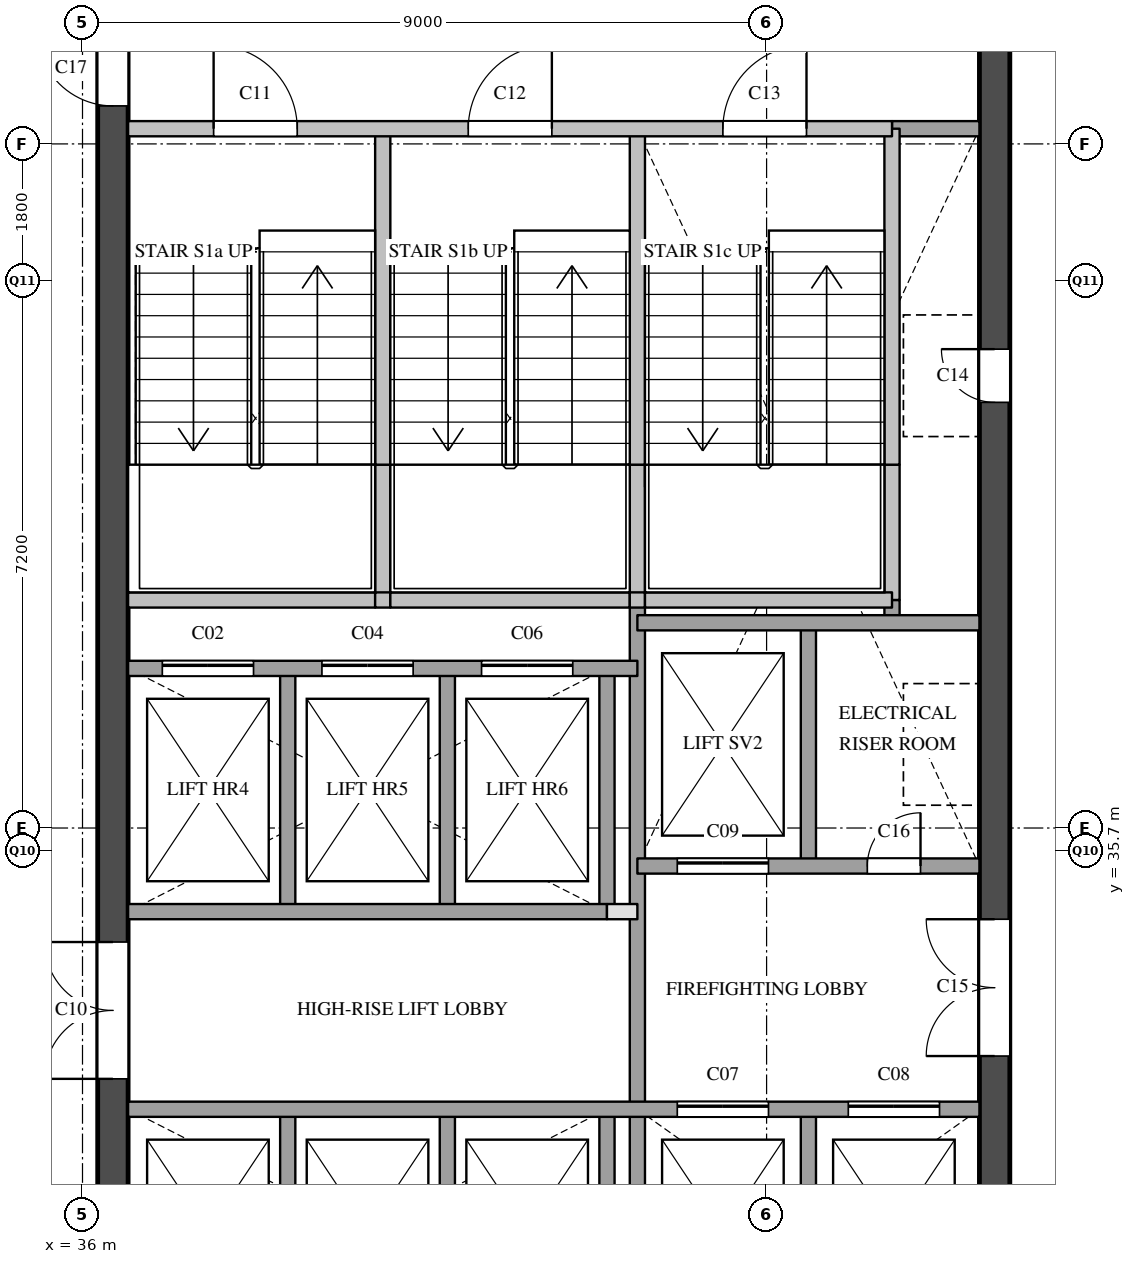
"""IFC4 building model, lengths in metres.
Left out: names, types, materials, properties, quantities, classifications, styles, units other than length and angle.
Written with IfcOpenShell. Run it as: python <this file> out.ifc"""

import sys

from ifc_helpers import new_model, si_unit, direction, frame, frame_2d, origin, place, context, subcontext, project, spatial, rectangle, extrude, element, fill, save


model = new_model("IFC4")
c1 = context("Model", 3, precision=1e-05, world=origin(), true_north=direction((0.0, 1.0)))
c2 = subcontext(c1, "Body", "Model", "MODEL_VIEW")
j1 = project(units=[si_unit("LENGTHUNIT", "METRE"), si_unit("PLANEANGLEUNIT", "RADIAN")], contexts=[c1])
p1 = place(None, origin())
s1 = spatial("IfcSite", under=j1, at=p1, CompositionType="ELEMENT")
p2 = place(p1, origin())
s2 = spatial("IfcBuilding", under=s1, at=p2, CompositionType="ELEMENT")
p3 = place(p2, frame((0.0, 0.0, 257.9)))
s3 = spatial("IfcBuildingStorey", under=s2, at=p3, CompositionType="ELEMENT", Elevation=257.9)
p4 = place(p3, frame((36.4, 29.1, 0.0), z_axis=(0.0, 0.0, 1.0), x_axis=(0.0, 1.0, 0.0)))
e1 = element("IfcWall", 1, at=p4, inside=s3, PredefinedType="SHEAR", context=c2, shape_type="SweptSolid", body=[
    extrude(rectangle(XDim=20.3, YDim=0.4, at=frame_2d((10.15, 0.0))), origin(), (0.0, 0.0, 1.0), 3.6),
])
p5 = place(p4, frame((3.6, 0.0, 0.0)))
e2 = element("IfcOpeningElement", 2, at=p5, cuts=e1, PredefinedType="OPENING", context=c2, shape_type="SweptSolid", body=[
    extrude(rectangle(XDim=1.8, YDim=2.1, at=frame_2d((0.9, 1.05))), frame((0.0, 0.21, 0.0), z_axis=(0.0, -1.0, 0.0), x_axis=(1.0, 0.0, 0.0)), (0.0, 0.0, 1.0), 0.42),
])
p6 = place(p4, frame((16.4, 0.0, 0.0)))
e3 = element("IfcOpeningElement", 3, at=p6, cuts=e1, PredefinedType="OPENING", context=c2, shape_type="SweptSolid", body=[
    extrude(rectangle(XDim=1.0, YDim=2.1, at=frame_2d((0.5, 1.05))), frame((0.0, 0.21, 0.0), z_axis=(0.0, -1.0, 0.0), x_axis=(1.0, 0.0, 0.0)), (0.0, 0.0, 1.0), 0.42),
])
p7 = place(p3, frame((48.0, 29.1, 0.0), z_axis=(0.0, 0.0, 1.0), x_axis=(0.0, 1.0, 0.0)))
e4 = element("IfcWall", 4, at=p7, inside=s3, PredefinedType="SHEAR", context=c2, shape_type="SweptSolid", body=[
    extrude(rectangle(XDim=20.3, YDim=0.4, at=frame_2d((10.15, 0.0))), origin(), (0.0, 0.0, 1.0), 3.6),
])
p8 = place(p7, frame((12.5, 0.0, 0.0)))
e5 = element("IfcOpeningElement", 5, at=p8, cuts=e4, PredefinedType="OPENING", context=c2, shape_type="SweptSolid", body=[
    extrude(rectangle(XDim=0.7, YDim=2.1, at=frame_2d((0.35, 1.05))), frame((0.0, 0.21, 0.0), z_axis=(0.0, -1.0, 0.0), x_axis=(1.0, 0.0, 0.0)), (0.0, 0.0, 1.0), 0.42),
])
p9 = place(p7, frame((3.9, 0.0, 0.0)))
e6 = element("IfcOpeningElement", 6, at=p9, cuts=e4, PredefinedType="OPENING", context=c2, shape_type="SweptSolid", body=[
    extrude(rectangle(XDim=1.8, YDim=2.1, at=frame_2d((0.9, 1.05))), frame((0.0, 0.21, 0.0), z_axis=(0.0, -1.0, 0.0), x_axis=(1.0, 0.0, 0.0)), (0.0, 0.0, 1.0), 0.42),
])
p10 = place(p3, frame((38.7, 29.1, 0.0), z_axis=(0.0, 0.0, 1.0), x_axis=(0.0, 1.0, 0.0)))
e7 = element("IfcWall", 7, at=p10, inside=s3, PredefinedType="SOLIDWALL", context=c2, shape_type="SweptSolid", body=[
    extrude(rectangle(XDim=3.2, YDim=0.2, at=frame_2d((1.6, 0.0))), origin(), (0.0, 0.0, 1.0), 3.6),
])
p11 = place(p3, frame((38.7, 34.9, 0.0), z_axis=(0.0, 0.0, 1.0), x_axis=(0.0, 1.0, 0.0)))
e8 = element("IfcWall", 8, at=p11, inside=s3, PredefinedType="SOLIDWALL", context=c2, shape_type="SweptSolid", body=[
    extrude(rectangle(XDim=3.2, YDim=0.2, at=frame_2d((1.6, 0.0))), origin(), (0.0, 0.0, 1.0), 3.6),
])
p12 = place(p3, frame((39.95, 39.0, 0.0), z_axis=(0.0, 0.0, 1.0), x_axis=(0.0, 1.0, 0.0)))
e9 = element("IfcWall", 9, at=p12, inside=s3, PredefinedType="SOLIDWALL", context=c2, shape_type="SweptSolid", body=[
    extrude(rectangle(XDim=1.78, YDim=0.2, at=frame_2d((0.89, 0.0))), origin(), (0.0, 0.0, 1.0), 3.6),
])
p13 = place(p3, frame((39.95, 40.78, 0.0), z_axis=(0.0, 0.0, 1.0), x_axis=(0.0, 1.0, 0.0)))
e10 = element("IfcWall", 10, at=p13, inside=s3, PredefinedType="SOLIDWALL", context=c2, shape_type="SweptSolid", body=[
    extrude(rectangle(XDim=4.42, YDim=0.2, at=frame_2d((2.21, 0.0))), origin(), (0.0, 0.0, 1.0), 3.6),
])
p14 = place(p3, frame((40.8, 29.1, 0.0), z_axis=(0.0, 0.0, 1.0), x_axis=(0.0, 1.0, 0.0)))
e11 = element("IfcWall", 11, at=p14, inside=s3, PredefinedType="SOLIDWALL", context=c2, shape_type="SweptSolid", body=[
    extrude(rectangle(XDim=3.2, YDim=0.2, at=frame_2d((1.6, 0.0))), origin(), (0.0, 0.0, 1.0), 3.6),
])
p15 = place(p3, frame((40.8, 34.9, 0.0), z_axis=(0.0, 0.0, 1.0), x_axis=(0.0, 1.0, 0.0)))
e12 = element("IfcWall", 12, at=p15, inside=s3, PredefinedType="SOLIDWALL", context=c2, shape_type="SweptSolid", body=[
    extrude(rectangle(XDim=3.2, YDim=0.2, at=frame_2d((1.6, 0.0))), origin(), (0.0, 0.0, 1.0), 3.6),
])
p16 = place(p3, frame((42.9, 29.1, 0.0), z_axis=(0.0, 0.0, 1.0), x_axis=(0.0, 1.0, 0.0)))
e13 = element("IfcWall", 13, at=p16, inside=s3, PredefinedType="SOLIDWALL", context=c2, shape_type="SweptSolid", body=[
    extrude(rectangle(XDim=3.2, YDim=0.2, at=frame_2d((1.6, 0.0))), origin(), (0.0, 0.0, 1.0), 3.6),
])
p17 = place(p3, frame((42.9, 34.9, 0.0), z_axis=(0.0, 0.0, 1.0), x_axis=(0.0, 1.0, 0.0)))
e14 = element("IfcWall", 14, at=p17, inside=s3, PredefinedType="SOLIDWALL", context=c2, shape_type="SweptSolid", body=[
    extrude(rectangle(XDim=3.2, YDim=0.2, at=frame_2d((1.6, 0.0))), origin(), (0.0, 0.0, 1.0), 3.6),
])
p18 = place(p3, frame((43.3, 29.1, 0.0), z_axis=(0.0, 0.0, 1.0), x_axis=(0.0, 1.0, 0.0)))
e15 = element("IfcWall", 15, at=p18, inside=s3, PredefinedType="SOLIDWALL", context=c2, shape_type="SweptSolid", body=[
    extrude(rectangle(XDim=9.9, YDim=0.2, at=frame_2d((4.95, 0.0))), origin(), (0.0, 0.0, 1.0), 3.6),
])
p19 = place(p3, frame((43.3, 39.0, 0.0), z_axis=(0.0, 0.0, 1.0), x_axis=(0.0, 1.0, 0.0)))
e16 = element("IfcWall", 16, at=p19, inside=s3, PredefinedType="SOLIDWALL", context=c2, shape_type="SweptSolid", body=[
    extrude(rectangle(XDim=1.78, YDim=0.2, at=frame_2d((0.89, 0.0))), origin(), (0.0, 0.0, 1.0), 3.6),
])
p20 = place(p3, frame((43.3, 40.78, 0.0), z_axis=(0.0, 0.0, 1.0), x_axis=(0.0, 1.0, 0.0)))
e17 = element("IfcWall", 17, at=p20, inside=s3, PredefinedType="SOLIDWALL", context=c2, shape_type="SweptSolid", body=[
    extrude(rectangle(XDim=4.42, YDim=0.2, at=frame_2d((2.21, 0.0))), origin(), (0.0, 0.0, 1.0), 3.6),
])
for number, where, z_axis, x_axis in (
    (18, (45.55, 29.1, 0.0), (0.0, 0.0, 1.0), (0.0, 1.0, 0.0)),
    (19, (45.55, 35.5, 0.0), (0.0, 0.0, 1.0), (0.0, 1.0, 0.0)),
):
    element("IfcWall", number, at=place(p3, frame(where, z_axis=z_axis, x_axis=x_axis)), inside=s3, PredefinedType="SOLIDWALL", context=c2, shape_type="SweptSolid", body=[
        extrude(rectangle(XDim=3.2, YDim=0.2, at=frame_2d((1.6, 0.0))), origin(), (0.0, 0.0, 1.0), 3.6),
    ])
p21 = place(p3, frame((46.65, 38.7, 0.0), z_axis=(0.0, 0.0, 1.0), x_axis=(0.0, 1.0, 0.0)))
e20 = element("IfcWall", 20, at=p21, inside=s3, PredefinedType="SOLIDWALL", context=c2, shape_type="SweptSolid", body=[
    extrude(rectangle(XDim=0.3, YDim=0.2, at=frame_2d((0.15, 0.0))), origin(), (0.0, 0.0, 1.0), 3.6),
])
p22 = place(p3, frame((46.65, 39.0, 0.0), z_axis=(0.0, 0.0, 1.0), x_axis=(0.0, 1.0, 0.0)))
e21 = element("IfcWall", 21, at=p22, inside=s3, PredefinedType="SOLIDWALL", context=c2, shape_type="SweptSolid", body=[
    extrude(rectangle(XDim=1.78, YDim=0.2, at=frame_2d((0.89, 0.0))), origin(), (0.0, 0.0, 1.0), 3.6),
])
p23 = place(p3, frame((46.65, 40.78, 0.0), z_axis=(0.0, 0.0, 1.0), x_axis=(0.0, 1.0, 0.0)))
e22 = element("IfcWall", 22, at=p23, inside=s3, PredefinedType="SOLIDWALL", context=c2, shape_type="SweptSolid", body=[
    extrude(rectangle(XDim=4.42, YDim=0.2, at=frame_2d((2.21, 0.0))), origin(), (0.0, 0.0, 1.0), 3.6),
])
p24 = place(p3, frame((36.6, 32.3, 0.0), z_axis=(0.0, 0.0, 1.0), x_axis=(1.0, 0.0, 0.0)))
e23 = element("IfcWall", 23, at=p24, inside=s3, PredefinedType="SOLIDWALL", context=c2, shape_type="SweptSolid", body=[
    extrude(rectangle(XDim=11.2, YDim=0.2, at=frame_2d((5.6, 0.0))), origin(), (0.0, 0.0, 1.0), 3.6),
])
p25 = place(p24, frame((7.225, 0.0, 0.0)))
e24 = element("IfcOpeningElement", 24, at=p25, cuts=e23, PredefinedType="OPENING", context=c2, shape_type="SweptSolid", body=[
    extrude(rectangle(XDim=1.2, YDim=2.1, at=frame_2d((0.6, 1.05))), frame((0.0, 0.11, 0.0), z_axis=(0.0, -1.0, 0.0), x_axis=(1.0, 0.0, 0.0)), (0.0, 0.0, 1.0), 0.22),
])
p26 = place(p24, frame((9.475, 0.0, 0.0)))
e25 = element("IfcOpeningElement", 25, at=p26, cuts=e23, PredefinedType="OPENING", context=c2, shape_type="SweptSolid", body=[
    extrude(rectangle(XDim=1.2, YDim=2.1, at=frame_2d((0.6, 1.05))), frame((0.0, 0.11, 0.0), z_axis=(0.0, -1.0, 0.0), x_axis=(1.0, 0.0, 0.0)), (0.0, 0.0, 1.0), 0.22),
])
p27 = place(p3, frame((42.9, 34.9, 0.0), z_axis=(0.0, 0.0, 1.0), x_axis=(1.0, 0.0, 0.0)))
e26 = element("IfcWall", 26, at=p27, inside=s3, PredefinedType="PARTITIONING", context=c2, shape_type="SweptSolid", body=[
    extrude(rectangle(XDim=0.4, YDim=0.2, at=frame_2d((0.2, 0.0))), origin(), (0.0, 0.0, 1.0), 3.6),
])
p28 = place(p3, frame((36.6, 34.9, 0.0), z_axis=(0.0, 0.0, 1.0), x_axis=(1.0, 0.0, 0.0)))
e27 = element("IfcWall", 27, at=p28, inside=s3, PredefinedType="SOLIDWALL", context=c2, shape_type="SweptSolid", body=[
    extrude(rectangle(XDim=6.3, YDim=0.2, at=frame_2d((3.15, 0.0))), origin(), (0.0, 0.0, 1.0), 3.6),
])
p29 = place(p3, frame((43.3, 35.5, 0.0), z_axis=(0.0, 0.0, 1.0), x_axis=(1.0, 0.0, 0.0)))
e28 = element("IfcWall", 28, at=p29, inside=s3, PredefinedType="SOLIDWALL", context=c2, shape_type="SweptSolid", body=[
    extrude(rectangle(XDim=4.5, YDim=0.2, at=frame_2d((2.25, 0.0))), origin(), (0.0, 0.0, 1.0), 3.6),
])
p30 = place(p29, frame((0.525, 0.0, 0.0)))
e29 = element("IfcOpeningElement", 29, at=p30, cuts=e28, PredefinedType="OPENING", context=c2, shape_type="SweptSolid", body=[
    extrude(rectangle(XDim=1.2, YDim=2.1, at=frame_2d((0.6, 1.05))), frame((0.0, 0.11, 0.0), z_axis=(0.0, -1.0, 0.0), x_axis=(1.0, 0.0, 0.0)), (0.0, 0.0, 1.0), 0.22),
])
p31 = place(p29, frame((3.025, 0.0, 0.0)))
e30 = element("IfcOpeningElement", 30, at=p31, cuts=e28, PredefinedType="OPENING", context=c2, shape_type="SweptSolid", body=[
    extrude(rectangle(XDim=0.7, YDim=2.1, at=frame_2d((0.35, 1.05))), frame((0.0, 0.11, 0.0), z_axis=(0.0, -1.0, 0.0), x_axis=(1.0, 0.0, 0.0)), (0.0, 0.0, 1.0), 0.22),
])
p32 = place(p3, frame((36.6, 38.1, 0.0), z_axis=(0.0, 0.0, 1.0), x_axis=(1.0, 0.0, 0.0)))
e31 = element("IfcWall", 31, at=p32, inside=s3, PredefinedType="SOLIDWALL", context=c2, shape_type="SweptSolid", body=[
    extrude(rectangle(XDim=6.7, YDim=0.2, at=frame_2d((3.35, 0.0))), origin(), (0.0, 0.0, 1.0), 3.6),
])
p33 = place(p32, frame((0.45, 0.0, 0.0)))
e32 = element("IfcOpeningElement", 32, at=p33, cuts=e31, PredefinedType="OPENING", context=c2, shape_type="SweptSolid", body=[
    extrude(rectangle(XDim=1.2, YDim=2.1, at=frame_2d((0.6, 1.05))), frame((0.0, 0.11, 0.0), z_axis=(0.0, -1.0, 0.0), x_axis=(1.0, 0.0, 0.0)), (0.0, 0.0, 1.0), 0.22),
])
p34 = place(p32, frame((2.55, 0.0, 0.0)))
e33 = element("IfcOpeningElement", 33, at=p34, cuts=e31, PredefinedType="OPENING", context=c2, shape_type="SweptSolid", body=[
    extrude(rectangle(XDim=1.2, YDim=2.1, at=frame_2d((0.6, 1.05))), frame((0.0, 0.11, 0.0), z_axis=(0.0, -1.0, 0.0), x_axis=(1.0, 0.0, 0.0)), (0.0, 0.0, 1.0), 0.22),
])
p35 = place(p32, frame((4.65, 0.0, 0.0)))
e34 = element("IfcOpeningElement", 34, at=p35, cuts=e31, PredefinedType="OPENING", context=c2, shape_type="SweptSolid", body=[
    extrude(rectangle(XDim=1.2, YDim=2.1, at=frame_2d((0.6, 1.05))), frame((0.0, 0.11, 0.0), z_axis=(0.0, -1.0, 0.0), x_axis=(1.0, 0.0, 0.0)), (0.0, 0.0, 1.0), 0.22),
])
p36 = place(p3, frame((43.3, 38.7, 0.0), z_axis=(0.0, 0.0, 1.0), x_axis=(1.0, 0.0, 0.0)))
e35 = element("IfcWall", 35, at=p36, inside=s3, PredefinedType="SOLIDWALL", context=c2, shape_type="SweptSolid", body=[
    extrude(rectangle(XDim=4.5, YDim=0.2, at=frame_2d((2.25, 0.0))), origin(), (0.0, 0.0, 1.0), 3.6),
])
p37 = place(p3, frame((36.6, 39.0, 0.0), z_axis=(0.0, 0.0, 1.0), x_axis=(1.0, 0.0, 0.0)))
e36 = element("IfcWall", 36, at=p37, inside=s3, PredefinedType="SOLIDWALL", context=c2, shape_type="SweptSolid", body=[
    extrude(rectangle(XDim=3.25, YDim=0.2, at=frame_2d((1.625, 0.0))), origin(), (0.0, 0.0, 1.0), 3.6),
])
p38 = place(p3, frame((39.85, 39.0, 0.0), z_axis=(0.0, 0.0, 1.0), x_axis=(1.0, 0.0, 0.0)))
e37 = element("IfcWall", 37, at=p38, inside=s3, PredefinedType="SOLIDWALL", context=c2, shape_type="SweptSolid", body=[
    extrude(rectangle(XDim=0.2, YDim=0.2, at=frame_2d((0.1, 0.0))), origin(), (0.0, 0.0, 1.0), 3.6),
])
p39 = place(p3, frame((40.05, 39.0, 0.0), z_axis=(0.0, 0.0, 1.0), x_axis=(1.0, 0.0, 0.0)))
e38 = element("IfcWall", 38, at=p39, inside=s3, PredefinedType="SOLIDWALL", context=c2, shape_type="SweptSolid", body=[
    extrude(rectangle(XDim=3.15, YDim=0.2, at=frame_2d((1.575, 0.0))), origin(), (0.0, 0.0, 1.0), 3.6),
])
p40 = place(p3, frame((43.2, 39.0, 0.0), z_axis=(0.0, 0.0, 1.0), x_axis=(1.0, 0.0, 0.0)))
e39 = element("IfcWall", 39, at=p40, inside=s3, PredefinedType="SOLIDWALL", context=c2, shape_type="SweptSolid", body=[
    extrude(rectangle(XDim=0.2, YDim=0.2, at=frame_2d((0.1, 0.0))), origin(), (0.0, 0.0, 1.0), 3.6),
])
p41 = place(p3, frame((43.4, 39.0, 0.0), z_axis=(0.0, 0.0, 1.0), x_axis=(1.0, 0.0, 0.0)))
e40 = element("IfcWall", 40, at=p41, inside=s3, PredefinedType="SOLIDWALL", context=c2, shape_type="SweptSolid", body=[
    extrude(rectangle(XDim=3.25, YDim=0.2, at=frame_2d((1.625, 0.0))), origin(), (0.0, 0.0, 1.0), 3.6),
])
p42 = place(p3, frame((46.65, 45.2, 0.0), z_axis=(0.0, 0.0, 1.0), x_axis=(1.0, 0.0, 0.0)))
e41 = element("IfcWall", 41, at=p42, inside=s3, PredefinedType="SOLIDWALL", context=c2, shape_type="SweptSolid", body=[
    extrude(rectangle(XDim=1.15, YDim=0.2, at=frame_2d((0.575, 0.0))), origin(), (0.0, 0.0, 1.0), 3.6),
])
p43 = place(p3, frame((36.6, 45.2, 0.0), z_axis=(0.0, 0.0, 1.0), x_axis=(1.0, 0.0, 0.0)))
e42 = element("IfcWall", 42, at=p43, inside=s3, PredefinedType="SOLIDWALL", context=c2, shape_type="SweptSolid", body=[
    extrude(rectangle(XDim=10.05, YDim=0.2, at=frame_2d((5.025, 0.0))), origin(), (0.0, 0.0, 1.0), 3.6),
])
p44 = place(p43, frame((1.125, 0.0, 0.0)))
e43 = element("IfcOpeningElement", 43, at=p44, cuts=e42, PredefinedType="OPENING", context=c2, shape_type="SweptSolid", body=[
    extrude(rectangle(XDim=1.1, YDim=2.1, at=frame_2d((0.55, 1.05))), frame((0.0, 0.11, 0.0), z_axis=(0.0, -1.0, 0.0), x_axis=(1.0, 0.0, 0.0)), (0.0, 0.0, 1.0), 0.22),
])
p45 = place(p43, frame((4.475, 0.0, 0.0)))
e44 = element("IfcOpeningElement", 44, at=p45, cuts=e42, PredefinedType="OPENING", context=c2, shape_type="SweptSolid", body=[
    extrude(rectangle(XDim=1.1, YDim=2.1, at=frame_2d((0.55, 1.05))), frame((0.0, 0.11, 0.0), z_axis=(0.0, -1.0, 0.0), x_axis=(1.0, 0.0, 0.0)), (0.0, 0.0, 1.0), 0.22),
])
p46 = place(p43, frame((7.825, 0.0, 0.0)))
e45 = element("IfcOpeningElement", 45, at=p46, cuts=e42, PredefinedType="OPENING", context=c2, shape_type="SweptSolid", body=[
    extrude(rectangle(XDim=1.1, YDim=2.1, at=frame_2d((0.55, 1.05))), frame((0.0, 0.11, 0.0), z_axis=(0.0, -1.0, 0.0), x_axis=(1.0, 0.0, 0.0)), (0.0, 0.0, 1.0), 0.22),
])
p47 = place(p33, origin())
e46 = element("IfcDoor", 46, at=p47, inside=s3, OperationType="SLIDING_TO_LEFT", PredefinedType="DOOR", context=c2, shape_type="SweptSolid", body=[
    extrude(rectangle(XDim=1.2, YDim=2.1, at=frame_2d((0.6, 1.05))), frame((0.0, 0.025, 0.0), z_axis=(0.0, -1.0, 0.0), x_axis=(1.0, 0.0, 0.0)), (0.0, 0.0, 1.0), 0.05),
])
fill(e32, e46)
p48 = place(p34, origin())
e47 = element("IfcDoor", 47, at=p48, inside=s3, OperationType="SLIDING_TO_LEFT", PredefinedType="DOOR", context=c2, shape_type="SweptSolid", body=[
    extrude(rectangle(XDim=1.2, YDim=2.1, at=frame_2d((0.6, 1.05))), frame((0.0, 0.025, 0.0), z_axis=(0.0, -1.0, 0.0), x_axis=(1.0, 0.0, 0.0)), (0.0, 0.0, 1.0), 0.05),
])
fill(e33, e47)
p49 = place(p35, origin())
e48 = element("IfcDoor", 48, at=p49, inside=s3, OperationType="SLIDING_TO_LEFT", PredefinedType="DOOR", context=c2, shape_type="SweptSolid", body=[
    extrude(rectangle(XDim=1.2, YDim=2.1, at=frame_2d((0.6, 1.05))), frame((0.0, 0.025, 0.0), z_axis=(0.0, -1.0, 0.0), x_axis=(1.0, 0.0, 0.0)), (0.0, 0.0, 1.0), 0.05),
])
fill(e34, e48)
p50 = place(p25, origin())
e49 = element("IfcDoor", 49, at=p50, inside=s3, OperationType="SLIDING_TO_LEFT", PredefinedType="DOOR", context=c2, shape_type="SweptSolid", body=[
    extrude(rectangle(XDim=1.2, YDim=2.1, at=frame_2d((0.6, 1.05))), frame((0.0, 0.025, 0.0), z_axis=(0.0, -1.0, 0.0), x_axis=(1.0, 0.0, 0.0)), (0.0, 0.0, 1.0), 0.05),
])
fill(e24, e49)
p51 = place(p26, origin())
e50 = element("IfcDoor", 50, at=p51, inside=s3, OperationType="SLIDING_TO_LEFT", PredefinedType="DOOR", context=c2, shape_type="SweptSolid", body=[
    extrude(rectangle(XDim=1.2, YDim=2.1, at=frame_2d((0.6, 1.05))), frame((0.0, 0.025, 0.0), z_axis=(0.0, -1.0, 0.0), x_axis=(1.0, 0.0, 0.0)), (0.0, 0.0, 1.0), 0.05),
])
fill(e25, e50)
p52 = place(p30, origin())
e51 = element("IfcDoor", 51, at=p52, inside=s3, OperationType="SLIDING_TO_LEFT", PredefinedType="DOOR", context=c2, shape_type="SweptSolid", body=[
    extrude(rectangle(XDim=1.2, YDim=2.1, at=frame_2d((0.6, 1.05))), frame((0.0, 0.025, 0.0), z_axis=(0.0, -1.0, 0.0), x_axis=(1.0, 0.0, 0.0)), (0.0, 0.0, 1.0), 0.05),
])
fill(e29, e51)
p53 = place(p5, origin())
e52 = element("IfcDoor", 52, at=p53, inside=s3, OperationType="DOUBLE_DOOR_SINGLE_SWING", PredefinedType="DOOR", context=c2, shape_type="SweptSolid", body=[
    extrude(rectangle(XDim=1.8, YDim=2.1, at=frame_2d((0.9, 1.05))), frame((0.0, 0.025, 0.0), z_axis=(0.0, -1.0, 0.0), x_axis=(1.0, 0.0, 0.0)), (0.0, 0.0, 1.0), 0.05),
])
fill(e2, e52)
p54 = place(p44, origin())
e53 = element("IfcDoor", 53, at=p54, inside=s3, OperationType="SINGLE_SWING_LEFT", PredefinedType="DOOR", context=c2, shape_type="SweptSolid", body=[
    extrude(rectangle(XDim=1.1, YDim=2.1, at=frame_2d((0.55, 1.05))), frame((0.0, 0.025, 0.0), z_axis=(0.0, -1.0, 0.0), x_axis=(1.0, 0.0, 0.0)), (0.0, 0.0, 1.0), 0.05),
])
fill(e43, e53)
p55 = place(p45, origin())
e54 = element("IfcDoor", 54, at=p55, inside=s3, OperationType="SINGLE_SWING_RIGHT", PredefinedType="DOOR", context=c2, shape_type="SweptSolid", body=[
    extrude(rectangle(XDim=1.1, YDim=2.1, at=frame_2d((0.55, 1.05))), frame((0.0, 0.025, 0.0), z_axis=(0.0, -1.0, 0.0), x_axis=(1.0, 0.0, 0.0)), (0.0, 0.0, 1.0), 0.05),
])
fill(e44, e54)
p56 = place(p46, origin())
e55 = element("IfcDoor", 55, at=p56, inside=s3, OperationType="SINGLE_SWING_RIGHT", PredefinedType="DOOR", context=c2, shape_type="SweptSolid", body=[
    extrude(rectangle(XDim=1.1, YDim=2.1, at=frame_2d((0.55, 1.05))), frame((0.0, 0.025, 0.0), z_axis=(0.0, -1.0, 0.0), x_axis=(1.0, 0.0, 0.0)), (0.0, 0.0, 1.0), 0.05),
])
fill(e45, e55)
p57 = place(p8, origin())
e56 = element("IfcDoor", 56, at=p57, inside=s3, OperationType="SINGLE_SWING_RIGHT", PredefinedType="DOOR", context=c2, shape_type="SweptSolid", body=[
    extrude(rectangle(XDim=0.7, YDim=2.1, at=frame_2d((0.35, 1.05))), frame((0.0, 0.025, 0.0), z_axis=(0.0, -1.0, 0.0), x_axis=(1.0, 0.0, 0.0)), (0.0, 0.0, 1.0), 0.05),
])
fill(e5, e56)
p58 = place(p9, origin())
e57 = element("IfcDoor", 57, at=p58, inside=s3, OperationType="DOUBLE_DOOR_SINGLE_SWING", PredefinedType="DOOR", context=c2, shape_type="SweptSolid", body=[
    extrude(rectangle(XDim=1.8, YDim=2.1, at=frame_2d((0.9, 1.05))), frame((0.0, 0.025, 0.0), z_axis=(0.0, -1.0, 0.0), x_axis=(1.0, 0.0, 0.0)), (0.0, 0.0, 1.0), 0.05),
])
fill(e6, e57)
p59 = place(p31, origin())
e58 = element("IfcDoor", 58, at=p59, inside=s3, OperationType="SINGLE_SWING_RIGHT", PredefinedType="DOOR", context=c2, shape_type="SweptSolid", body=[
    extrude(rectangle(XDim=0.7, YDim=2.1, at=frame_2d((0.35, 1.05))), frame((0.0, 0.025, 0.0), z_axis=(0.0, -1.0, 0.0), x_axis=(1.0, 0.0, 0.0)), (0.0, 0.0, 1.0), 0.05),
])
fill(e30, e58)
p60 = place(p6, origin())
e59 = element("IfcDoor", 59, at=p60, inside=s3, OperationType="SINGLE_SWING_RIGHT", PredefinedType="DOOR", context=c2, shape_type="SweptSolid", body=[
    extrude(rectangle(XDim=1.0, YDim=2.1, at=frame_2d((0.5, 1.05))), frame((0.0, 0.025, 0.0), z_axis=(0.0, -1.0, 0.0), x_axis=(1.0, 0.0, 0.0)), (0.0, 0.0, 1.0), 0.05),
])
fill(e3, e59)
save(model, sys.argv[1])
